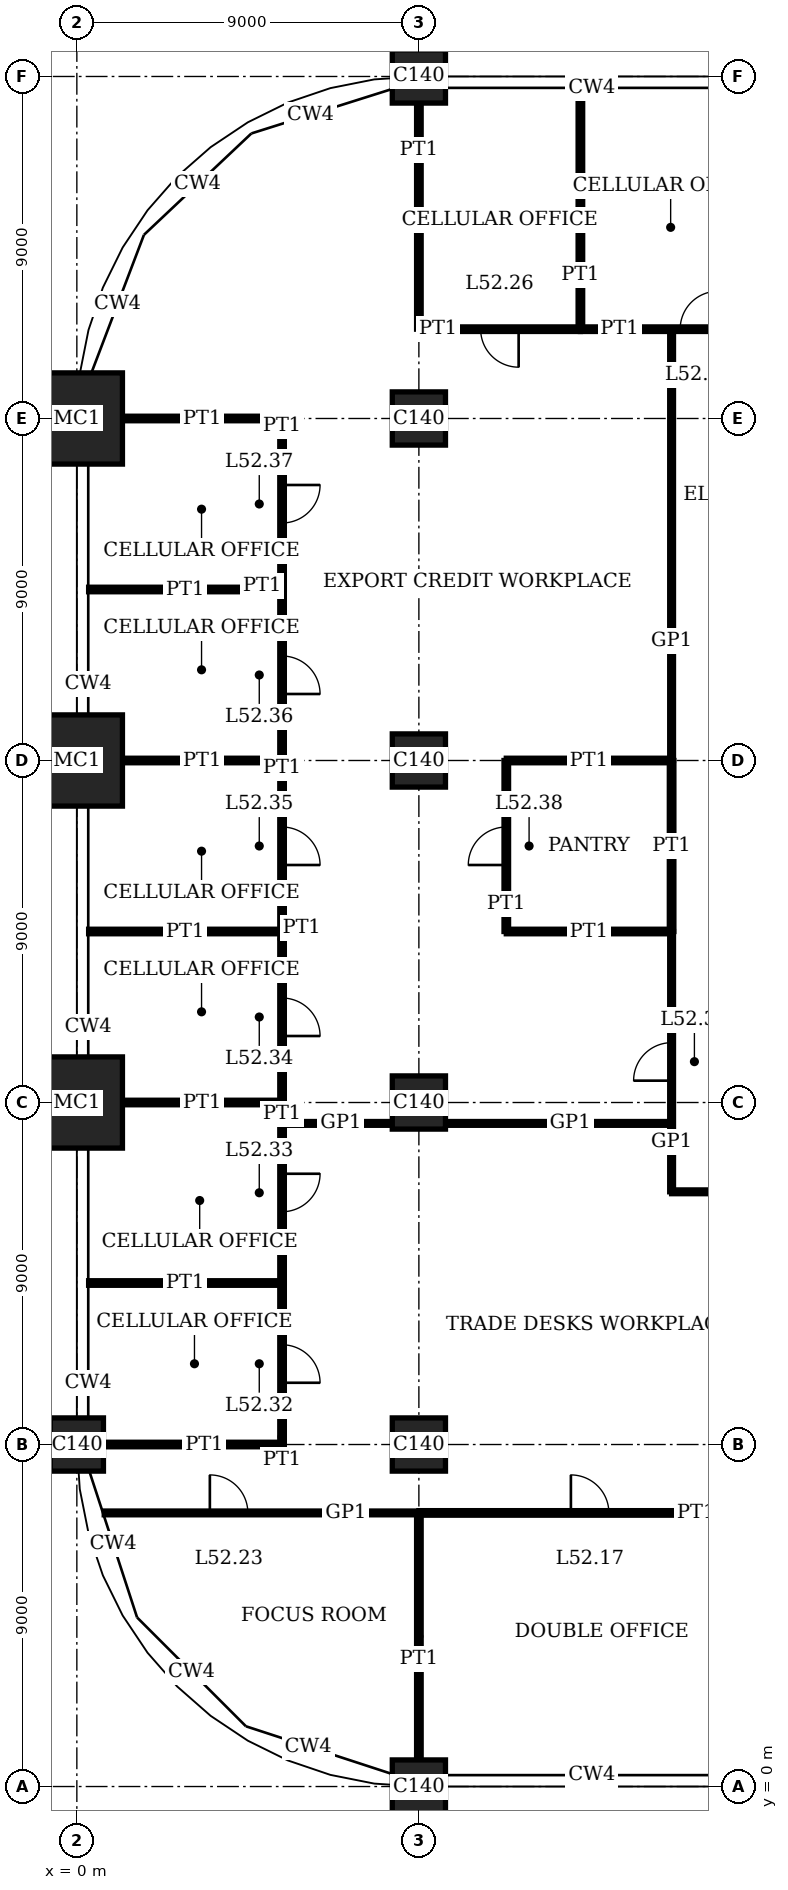
"""IFC4 building model, lengths in metres.
Left out: names, types, materials, properties, quantities, classifications, styles, units other than length and angle.
Written with IfcOpenShell. Run it as: python <this file> out.ifc"""

import sys

from ifc_helpers import new_model, si_unit, direction, frame, frame_2d, origin, origin_2d, place, context, subcontext, project, spatial, rectangle, extrude, element, fill, save


model = new_model("IFC4")
c1 = context("Model", 3, precision=1e-05, world=origin(), true_north=direction((0.0, 1.0)))
c2 = subcontext(c1, "Body", "Model", "MODEL_VIEW")
j1 = project(units=[si_unit("LENGTHUNIT", "METRE"), si_unit("PLANEANGLEUNIT", "RADIAN")], contexts=[c1])
p1 = place(None, origin())
s1 = spatial("IfcSite", under=j1, at=p1, CompositionType="ELEMENT")
p2 = place(p1, origin())
s2 = spatial("IfcBuilding", under=s1, at=p2, CompositionType="ELEMENT")
p3 = place(p2, frame((0.0, 0.0, 214.2)))
s3 = spatial("IfcBuildingStorey", under=s2, at=p3, CompositionType="ELEMENT", Elevation=214.2)
p4 = place(p3, frame((0.0, 9.0, 0.0), z_axis=(0.0, 0.0, 1.0), x_axis=(1.0, 0.0, 0.0)))
e1 = element("IfcColumn", 1, at=p4, inside=s3, PredefinedType="COLUMN", context=c2, shape_type="SweptSolid", body=[
    extrude(rectangle(XDim=1.4, YDim=1.4, at=origin_2d()), origin(), (0.0, 0.0, 1.0), 4.0),
])
for number, where, z_axis, x_axis in (
    (2, (0.0, 18.0, 0.0), (0.0, 0.0, 1.0), (1.0, 0.0, 0.0)),
    (3, (0.0, 27.0, 0.0), (0.0, 0.0, 1.0), (1.0, 0.0, 0.0)),
    (4, (0.0, 36.0, 0.0), (0.0, 0.0, 1.0), (1.0, 0.0, 0.0)),
):
    element("IfcColumn", number, at=place(p3, frame(where, z_axis=z_axis, x_axis=x_axis)), inside=s3, PredefinedType="COLUMN", context=c2, shape_type="SweptSolid", body=[
        extrude(rectangle(XDim=2.4, YDim=2.4, at=origin_2d()), origin(), (0.0, 0.0, 1.0), 4.0),
    ])
for number, where, z_axis, x_axis in (
    (5, (9.0, 0.0, 0.0), (0.0, 0.0, 1.0), (1.0, 0.0, 0.0)),
    (6, (9.0, 9.0, 0.0), (0.0, 0.0, 1.0), (1.0, 0.0, 0.0)),
    (7, (9.0, 18.0, 0.0), (0.0, 0.0, 1.0), (1.0, 0.0, 0.0)),
    (8, (9.0, 27.0, 0.0), (0.0, 0.0, 1.0), (1.0, 0.0, 0.0)),
    (9, (9.0, 36.0, 0.0), (0.0, 0.0, 1.0), (1.0, 0.0, 0.0)),
    (10, (9.0, 45.0, 0.0), (0.0, 0.0, 1.0), (1.0, 0.0, 0.0)),
):
    element("IfcColumn", number, at=place(p3, frame(where, z_axis=z_axis, x_axis=x_axis)), inside=s3, PredefinedType="COLUMN", context=c2, shape_type="SweptSolid", body=[
        extrude(rectangle(XDim=1.4, YDim=1.4, at=origin_2d()), origin(), (0.0, 0.0, 1.0), 4.0),
    ])
p5 = place(p3, frame((9.0, 7.2, 0.0), z_axis=(0.0, 0.0, 1.0), x_axis=(1.0, 0.0, 0.0)))
e11 = element("IfcWall", 11, at=p5, inside=s3, PredefinedType="PARTITIONING", context=c2, shape_type="SweptSolid", body=[
    extrude(rectangle(XDim=9.0, YDim=0.12, at=frame_2d((4.5, 0.0))), origin(), (0.0, 0.0, 1.0), 3.75),
])
p6 = place(p5, frame((4.0, 0.0, 0.0)))
e12 = element("IfcOpeningElement", 12, at=p6, cuts=e11, PredefinedType="OPENING", context=c2, shape_type="SweptSolid", body=[
    extrude(rectangle(XDim=1.0, YDim=2.4, at=frame_2d((0.5, 1.2))), frame((0.0, 0.07, 0.0), z_axis=(0.0, -1.0, 0.0), x_axis=(1.0, 0.0, 0.0)), (0.0, 0.0, 1.0), 0.14),
])
p7 = place(p3, frame((0.72, 7.2, 0.0), z_axis=(0.0, 0.0, 1.0), x_axis=(1.0, 0.0, 0.0)))
e13 = element("IfcWall", 13, at=p7, inside=s3, PredefinedType="PARTITIONING", context=c2, shape_type="SweptSolid", body=[
    extrude(rectangle(XDim=8.28, YDim=0.1, at=frame_2d((4.14, 0.0))), origin(), (0.0, 0.0, 1.0), 3.75),
])
p8 = place(p7, frame((2.78, 0.0, 0.0)))
e14 = element("IfcOpeningElement", 14, at=p8, cuts=e13, PredefinedType="OPENING", context=c2, shape_type="SweptSolid", body=[
    extrude(rectangle(XDim=1.0, YDim=2.4, at=frame_2d((0.5, 1.2))), frame((0.0, 0.06, 0.0), z_axis=(0.0, -1.0, 0.0), x_axis=(1.0, 0.0, 0.0)), (0.0, 0.0, 1.0), 0.12),
])
p9 = place(p3, frame((0.7, 9.0, 0.0), z_axis=(0.0, 0.0, 1.0), x_axis=(1.0, 0.0, 0.0)))
e15 = element("IfcWall", 15, at=p9, inside=s3, PredefinedType="PARTITIONING", context=c2, shape_type="SweptSolid", body=[
    extrude(rectangle(XDim=4.7, YDim=0.12, at=frame_2d((2.35, 0.0))), origin(), (0.0, 0.0, 1.0), 3.05),
])
p10 = place(p3, frame((0.31, 13.25, 0.0), z_axis=(0.0, 0.0, 1.0), x_axis=(1.0, 0.0, 0.0)))
e16 = element("IfcWall", 16, at=p10, inside=s3, PredefinedType="PARTITIONING", context=c2, shape_type="SweptSolid", body=[
    extrude(rectangle(XDim=5.09, YDim=0.12, at=frame_2d((2.545, 0.0))), origin(), (0.0, 0.0, 1.0), 3.1),
])
p11 = place(p3, frame((15.65, 15.65, 0.0), z_axis=(0.0, 0.0, 1.0), x_axis=(1.0, 0.0, 0.0)))
e17 = element("IfcWall", 17, at=p11, inside=s3, PredefinedType="PARTITIONING", context=c2, shape_type="SweptSolid", body=[
    extrude(rectangle(XDim=15.85, YDim=0.1, at=frame_2d((7.925, 0.0))), origin(), (0.0, 0.0, 1.0), 3.75),
])
p12 = place(p11, frame((7.425, 0.0, 0.0)))
e18 = element("IfcOpeningElement", 18, at=p12, cuts=e17, PredefinedType="OPENING", context=c2, shape_type="SweptSolid", body=[
    extrude(rectangle(XDim=1.0, YDim=2.4, at=frame_2d((0.5, 1.2))), frame((0.0, 0.06, 0.0), z_axis=(0.0, -1.0, 0.0), x_axis=(1.0, 0.0, 0.0)), (0.0, 0.0, 1.0), 0.12),
])
p13 = place(p3, frame((5.39, 17.45, 0.0), z_axis=(0.0, 0.0, 1.0), x_axis=(1.0, 0.0, 0.0)))
e19 = element("IfcWall", 19, at=p13, inside=s3, PredefinedType="PARTITIONING", context=c2, shape_type="SweptSolid", body=[
    extrude(rectangle(XDim=2.91, YDim=0.1, at=frame_2d((1.455, 0.0))), origin(), (0.0, 0.0, 1.0), 3.75),
])
p14 = place(p3, frame((9.7, 17.45, 0.0), z_axis=(0.0, 0.0, 1.0), x_axis=(1.0, 0.0, 0.0)))
e20 = element("IfcWall", 20, at=p14, inside=s3, PredefinedType="PARTITIONING", context=c2, shape_type="SweptSolid", body=[
    extrude(rectangle(XDim=5.95, YDim=0.1, at=frame_2d((2.975, 0.0))), origin(), (0.0, 0.0, 1.0), 3.75),
])
p15 = place(p3, frame((1.2, 18.0, 0.0), z_axis=(0.0, 0.0, 1.0), x_axis=(1.0, 0.0, 0.0)))
e21 = element("IfcWall", 21, at=p15, inside=s3, PredefinedType="PARTITIONING", context=c2, shape_type="SweptSolid", body=[
    extrude(rectangle(XDim=4.2, YDim=0.12, at=frame_2d((2.1, 0.0))), origin(), (0.0, 0.0, 1.0), 3.05),
])
p16 = place(p3, frame((0.31, 22.5, 0.0), z_axis=(0.0, 0.0, 1.0), x_axis=(1.0, 0.0, 0.0)))
e22 = element("IfcWall", 22, at=p16, inside=s3, PredefinedType="PARTITIONING", context=c2, shape_type="SweptSolid", body=[
    extrude(rectangle(XDim=5.09, YDim=0.12, at=frame_2d((2.545, 0.0))), origin(), (0.0, 0.0, 1.0), 3.1),
])
p17 = place(p3, frame((11.3, 22.5, 0.0), z_axis=(0.0, 0.0, 1.0), x_axis=(1.0, 0.0, 0.0)))
e23 = element("IfcWall", 23, at=p17, inside=s3, PredefinedType="PARTITIONING", context=c2, shape_type="SweptSolid", body=[
    extrude(rectangle(XDim=4.35, YDim=0.12, at=frame_2d((2.175, 0.0))), origin(), (0.0, 0.0, 1.0), 3.1),
])
p18 = place(p3, frame((1.2, 27.0, 0.0), z_axis=(0.0, 0.0, 1.0), x_axis=(1.0, 0.0, 0.0)))
e24 = element("IfcWall", 24, at=p18, inside=s3, PredefinedType="PARTITIONING", context=c2, shape_type="SweptSolid", body=[
    extrude(rectangle(XDim=4.2, YDim=0.12, at=frame_2d((2.1, 0.0))), origin(), (0.0, 0.0, 1.0), 3.05),
])
p19 = place(p3, frame((11.3, 27.0, 0.0), z_axis=(0.0, 0.0, 1.0), x_axis=(1.0, 0.0, 0.0)))
e25 = element("IfcWall", 25, at=p19, inside=s3, PredefinedType="PARTITIONING", context=c2, shape_type="SweptSolid", body=[
    extrude(rectangle(XDim=4.35, YDim=0.12, at=frame_2d((2.175, 0.0))), origin(), (0.0, 0.0, 1.0), 3.05),
])
p20 = place(p3, frame((0.31, 31.5, 0.0), z_axis=(0.0, 0.0, 1.0), x_axis=(1.0, 0.0, 0.0)))
e26 = element("IfcWall", 26, at=p20, inside=s3, PredefinedType="PARTITIONING", context=c2, shape_type="SweptSolid", body=[
    extrude(rectangle(XDim=5.09, YDim=0.12, at=frame_2d((2.545, 0.0))), origin(), (0.0, 0.0, 1.0), 3.1),
])
p21 = place(p3, frame((1.2, 36.0, 0.0), z_axis=(0.0, 0.0, 1.0), x_axis=(1.0, 0.0, 0.0)))
e27 = element("IfcWall", 27, at=p21, inside=s3, PredefinedType="PARTITIONING", context=c2, shape_type="SweptSolid", body=[
    extrude(rectangle(XDim=4.2, YDim=0.12, at=frame_2d((2.1, 0.0))), origin(), (0.0, 0.0, 1.0), 3.05),
])
p22 = place(p3, frame((9.0, 38.35, 0.0), z_axis=(0.0, 0.0, 1.0), x_axis=(1.0, 0.0, 0.0)))
e28 = element("IfcWall", 28, at=p22, inside=s3, PredefinedType="PARTITIONING", context=c2, shape_type="SweptSolid", body=[
    extrude(rectangle(XDim=4.25, YDim=0.12, at=frame_2d((2.125, 0.0))), origin(), (0.0, 0.0, 1.0), 3.75),
])
p23 = place(p22, frame((1.625, 0.0, 0.0)))
e29 = element("IfcOpeningElement", 29, at=p23, cuts=e28, PredefinedType="OPENING", context=c2, shape_type="SweptSolid", body=[
    extrude(rectangle(XDim=1.0, YDim=2.4, at=frame_2d((0.5, 1.2))), frame((0.0, 0.07, 0.0), z_axis=(0.0, -1.0, 0.0), x_axis=(1.0, 0.0, 0.0)), (0.0, 0.0, 1.0), 0.14),
])
p24 = place(p3, frame((13.25, 38.35, 0.0), z_axis=(0.0, 0.0, 1.0), x_axis=(1.0, 0.0, 0.0)))
e30 = element("IfcWall", 30, at=p24, inside=s3, PredefinedType="PARTITIONING", context=c2, shape_type="SweptSolid", body=[
    extrude(rectangle(XDim=4.75, YDim=0.12, at=frame_2d((2.375, 0.0))), origin(), (0.0, 0.0, 1.0), 3.75),
])
p25 = place(p24, frame((2.625, 0.0, 0.0)))
e31 = element("IfcOpeningElement", 31, at=p25, cuts=e30, PredefinedType="OPENING", context=c2, shape_type="SweptSolid", body=[
    extrude(rectangle(XDim=1.0, YDim=2.4, at=frame_2d((0.5, 1.2))), frame((0.0, 0.07, 0.0), z_axis=(0.0, -1.0, 0.0), x_axis=(1.0, 0.0, 0.0)), (0.0, 0.0, 1.0), 0.14),
])
p26 = place(p3, frame((5.4, 9.0, 0.0), z_axis=(0.0, 0.0, 1.0), x_axis=(0.0, 1.0, 0.0)))
e32 = element("IfcWall", 32, at=p26, inside=s3, PredefinedType="PARTITIONING", context=c2, shape_type="SweptSolid", body=[
    extrude(rectangle(XDim=4.25, YDim=0.12, at=frame_2d((2.125, 0.0))), origin(), (0.0, 0.0, 1.0), 3.75),
])
p27 = place(p26, frame((1.625, 0.0, 0.0)))
e33 = element("IfcOpeningElement", 33, at=p27, cuts=e32, PredefinedType="OPENING", context=c2, shape_type="SweptSolid", body=[
    extrude(rectangle(XDim=1.0, YDim=2.4, at=frame_2d((0.5, 1.2))), frame((0.0, 0.07, 0.0), z_axis=(0.0, -1.0, 0.0), x_axis=(1.0, 0.0, 0.0)), (0.0, 0.0, 1.0), 0.14),
])
p28 = place(p3, frame((5.4, 13.25, 0.0), z_axis=(0.0, 0.0, 1.0), x_axis=(0.0, 1.0, 0.0)))
e34 = element("IfcWall", 34, at=p28, inside=s3, PredefinedType="PARTITIONING", context=c2, shape_type="SweptSolid", body=[
    extrude(rectangle(XDim=4.75, YDim=0.12, at=frame_2d((2.375, 0.0))), origin(), (0.0, 0.0, 1.0), 3.75),
])
p29 = place(p28, frame((1.875, 0.0, 0.0)))
e35 = element("IfcOpeningElement", 35, at=p29, cuts=e34, PredefinedType="OPENING", context=c2, shape_type="SweptSolid", body=[
    extrude(rectangle(XDim=1.0, YDim=2.4, at=frame_2d((0.5, 1.2))), frame((0.0, 0.07, 0.0), z_axis=(0.0, -1.0, 0.0), x_axis=(1.0, 0.0, 0.0)), (0.0, 0.0, 1.0), 0.14),
])
p30 = place(p3, frame((5.4, 18.0, 0.0), z_axis=(0.0, 0.0, 1.0), x_axis=(0.0, 1.0, 0.0)))
e36 = element("IfcWall", 36, at=p30, inside=s3, PredefinedType="PARTITIONING", context=c2, shape_type="SweptSolid", body=[
    extrude(rectangle(XDim=4.5, YDim=0.12, at=frame_2d((2.25, 0.0))), origin(), (0.0, 0.0, 1.0), 3.75),
])
p31 = place(p30, frame((1.75, 0.0, 0.0)))
e37 = element("IfcOpeningElement", 37, at=p31, cuts=e36, PredefinedType="OPENING", context=c2, shape_type="SweptSolid", body=[
    extrude(rectangle(XDim=1.0, YDim=2.4, at=frame_2d((0.5, 1.2))), frame((0.0, 0.07, 0.0), z_axis=(0.0, -1.0, 0.0), x_axis=(1.0, 0.0, 0.0)), (0.0, 0.0, 1.0), 0.14),
])
p32 = place(p3, frame((5.4, 22.5, 0.0), z_axis=(0.0, 0.0, 1.0), x_axis=(0.0, 1.0, 0.0)))
e38 = element("IfcWall", 38, at=p32, inside=s3, PredefinedType="PARTITIONING", context=c2, shape_type="SweptSolid", body=[
    extrude(rectangle(XDim=4.5, YDim=0.12, at=frame_2d((2.25, 0.0))), origin(), (0.0, 0.0, 1.0), 3.75),
])
p33 = place(p32, frame((1.75, 0.0, 0.0)))
e39 = element("IfcOpeningElement", 39, at=p33, cuts=e38, PredefinedType="OPENING", context=c2, shape_type="SweptSolid", body=[
    extrude(rectangle(XDim=1.0, YDim=2.4, at=frame_2d((0.5, 1.2))), frame((0.0, 0.07, 0.0), z_axis=(0.0, -1.0, 0.0), x_axis=(1.0, 0.0, 0.0)), (0.0, 0.0, 1.0), 0.14),
])
p34 = place(p3, frame((5.4, 27.0, 0.0), z_axis=(0.0, 0.0, 1.0), x_axis=(0.0, 1.0, 0.0)))
e40 = element("IfcWall", 40, at=p34, inside=s3, PredefinedType="PARTITIONING", context=c2, shape_type="SweptSolid", body=[
    extrude(rectangle(XDim=4.5, YDim=0.12, at=frame_2d((2.25, 0.0))), origin(), (0.0, 0.0, 1.0), 3.75),
])
p35 = place(p34, frame((1.75, 0.0, 0.0)))
e41 = element("IfcOpeningElement", 41, at=p35, cuts=e40, PredefinedType="OPENING", context=c2, shape_type="SweptSolid", body=[
    extrude(rectangle(XDim=1.0, YDim=2.4, at=frame_2d((0.5, 1.2))), frame((0.0, 0.07, 0.0), z_axis=(0.0, -1.0, 0.0), x_axis=(1.0, 0.0, 0.0)), (0.0, 0.0, 1.0), 0.14),
])
p36 = place(p3, frame((5.4, 31.5, 0.0), z_axis=(0.0, 0.0, 1.0), x_axis=(0.0, 1.0, 0.0)))
e42 = element("IfcWall", 42, at=p36, inside=s3, PredefinedType="PARTITIONING", context=c2, shape_type="SweptSolid", body=[
    extrude(rectangle(XDim=4.5, YDim=0.12, at=frame_2d((2.25, 0.0))), origin(), (0.0, 0.0, 1.0), 3.75),
])
p37 = place(p36, frame((1.75, 0.0, 0.0)))
e43 = element("IfcOpeningElement", 43, at=p37, cuts=e42, PredefinedType="OPENING", context=c2, shape_type="SweptSolid", body=[
    extrude(rectangle(XDim=1.0, YDim=2.4, at=frame_2d((0.5, 1.2))), frame((0.0, 0.07, 0.0), z_axis=(0.0, -1.0, 0.0), x_axis=(1.0, 0.0, 0.0)), (0.0, 0.0, 1.0), 0.14),
])
p38 = place(p3, frame((9.0, 0.7, 0.0), z_axis=(0.0, 0.0, 1.0), x_axis=(0.0, 1.0, 0.0)))
e44 = element("IfcWall", 44, at=p38, inside=s3, PredefinedType="PARTITIONING", context=c2, shape_type="SweptSolid", body=[
    extrude(rectangle(XDim=6.5, YDim=0.12, at=frame_2d((3.25, 0.0))), origin(), (0.0, 0.0, 1.0), 3.05),
])
p39 = place(p3, frame((9.0, 38.35, 0.0), z_axis=(0.0, 0.0, 1.0), x_axis=(0.0, 1.0, 0.0)))
e45 = element("IfcWall", 45, at=p39, inside=s3, PredefinedType="PARTITIONING", context=c2, shape_type="SweptSolid", body=[
    extrude(rectangle(XDim=5.95, YDim=0.12, at=frame_2d((2.975, 0.0))), origin(), (0.0, 0.0, 1.0), 3.05),
])
p40 = place(p3, frame((11.3, 22.5, 0.0), z_axis=(0.0, 0.0, 1.0), x_axis=(0.0, 1.0, 0.0)))
e46 = element("IfcWall", 46, at=p40, inside=s3, PredefinedType="PARTITIONING", context=c2, shape_type="SweptSolid", body=[
    extrude(rectangle(XDim=4.5, YDim=0.12, at=frame_2d((2.25, 0.0))), origin(), (0.0, 0.0, 1.0), 3.75),
])
p41 = place(p40, frame((1.75, 0.0, 0.0)))
e47 = element("IfcOpeningElement", 47, at=p41, cuts=e46, PredefinedType="OPENING", context=c2, shape_type="SweptSolid", body=[
    extrude(rectangle(XDim=1.0, YDim=2.4, at=frame_2d((0.5, 1.2))), frame((0.0, 0.07, 0.0), z_axis=(0.0, -1.0, 0.0), x_axis=(1.0, 0.0, 0.0)), (0.0, 0.0, 1.0), 0.14),
])
p42 = place(p3, frame((13.25, 38.35, 0.0), z_axis=(0.0, 0.0, 1.0), x_axis=(0.0, 1.0, 0.0)))
e48 = element("IfcWall", 48, at=p42, inside=s3, PredefinedType="PARTITIONING", context=c2, shape_type="SweptSolid", body=[
    extrude(rectangle(XDim=6.34, YDim=0.12, at=frame_2d((3.17, 0.0))), origin(), (0.0, 0.0, 1.0), 3.75),
])
p43 = place(p3, frame((15.65, 22.5, 0.0), z_axis=(0.0, 0.0, 1.0), x_axis=(0.0, 1.0, 0.0)))
e49 = element("IfcWall", 49, at=p43, inside=s3, PredefinedType="PARTITIONING", context=c2, shape_type="SweptSolid", body=[
    extrude(rectangle(XDim=4.5, YDim=0.12, at=frame_2d((2.25, 0.0))), origin(), (0.0, 0.0, 1.0), 3.75),
])
p44 = place(p3, frame((15.65, 15.65, 0.0), z_axis=(0.0, 0.0, 1.0), x_axis=(0.0, 1.0, 0.0)))
e50 = element("IfcWall", 50, at=p44, inside=s3, PredefinedType="PARTITIONING", context=c2, shape_type="SweptSolid", body=[
    extrude(rectangle(XDim=6.85, YDim=0.1, at=frame_2d((3.425, 0.0))), origin(), (0.0, 0.0, 1.0), 3.75),
])
p45 = place(p44, frame((2.925, 0.0, 0.0)))
e51 = element("IfcOpeningElement", 51, at=p45, cuts=e50, PredefinedType="OPENING", context=c2, shape_type="SweptSolid", body=[
    extrude(rectangle(XDim=1.0, YDim=2.4, at=frame_2d((0.5, 1.2))), frame((0.0, 0.06, 0.0), z_axis=(0.0, -1.0, 0.0), x_axis=(1.0, 0.0, 0.0)), (0.0, 0.0, 1.0), 0.12),
])
p46 = place(p3, frame((15.65, 27.0, 0.0), z_axis=(0.0, 0.0, 1.0), x_axis=(0.0, 1.0, 0.0)))
e52 = element("IfcWall", 52, at=p46, inside=s3, PredefinedType="PARTITIONING", context=c2, shape_type="SweptSolid", body=[
    extrude(rectangle(XDim=11.35, YDim=0.1, at=frame_2d((5.675, 0.0))), origin(), (0.0, 0.0, 1.0), 3.75),
])
p47 = place(p6, origin())
e53 = element("IfcDoor", 53, at=p47, inside=s3, OperationType="SINGLE_SWING_RIGHT", PredefinedType="DOOR", context=c2, shape_type="SweptSolid", body=[
    extrude(rectangle(XDim=1.0, YDim=2.4, at=frame_2d((0.5, 1.2))), frame((0.0, 0.025, 0.0), z_axis=(0.0, -1.0, 0.0), x_axis=(1.0, 0.0, 0.0)), (0.0, 0.0, 1.0), 0.05),
])
fill(e12, e53)
p48 = place(p8, origin())
e54 = element("IfcDoor", 54, at=p48, inside=s3, OperationType="SINGLE_SWING_RIGHT", PredefinedType="DOOR", context=c2, shape_type="SweptSolid", body=[
    extrude(rectangle(XDim=1.0, YDim=2.4, at=frame_2d((0.5, 1.2))), frame((0.0, 0.02, 0.0), z_axis=(0.0, -1.0, 0.0), x_axis=(1.0, 0.0, 0.0)), (0.0, 0.0, 1.0), 0.04),
])
fill(e14, e54)
p49 = place(p23, origin())
e55 = element("IfcDoor", 55, at=p49, inside=s3, OperationType="SINGLE_SWING_RIGHT", PredefinedType="DOOR", context=c2, shape_type="SweptSolid", body=[
    extrude(rectangle(XDim=1.0, YDim=2.4, at=frame_2d((0.5, 1.2))), frame((0.0, 0.025, 0.0), z_axis=(0.0, -1.0, 0.0), x_axis=(1.0, 0.0, 0.0)), (0.0, 0.0, 1.0), 0.05),
])
fill(e29, e55)
p50 = place(p25, origin())
e56 = element("IfcDoor", 56, at=p50, inside=s3, OperationType="SINGLE_SWING_LEFT", PredefinedType="DOOR", context=c2, shape_type="SweptSolid", body=[
    extrude(rectangle(XDim=1.0, YDim=2.4, at=frame_2d((0.5, 1.2))), frame((0.0, 0.025, 0.0), z_axis=(0.0, -1.0, 0.0), x_axis=(1.0, 0.0, 0.0)), (0.0, 0.0, 1.0), 0.05),
])
fill(e31, e56)
p51 = place(p27, origin())
e57 = element("IfcDoor", 57, at=p51, inside=s3, OperationType="SINGLE_SWING_LEFT", PredefinedType="DOOR", context=c2, shape_type="SweptSolid", body=[
    extrude(rectangle(XDim=1.0, YDim=2.4, at=frame_2d((0.5, 1.2))), frame((0.0, 0.025, 0.0), z_axis=(0.0, -1.0, 0.0), x_axis=(1.0, 0.0, 0.0)), (0.0, 0.0, 1.0), 0.05),
])
fill(e33, e57)
p52 = place(p29, origin())
e58 = element("IfcDoor", 58, at=p52, inside=s3, OperationType="SINGLE_SWING_RIGHT", PredefinedType="DOOR", context=c2, shape_type="SweptSolid", body=[
    extrude(rectangle(XDim=1.0, YDim=2.4, at=frame_2d((0.5, 1.2))), frame((0.0, 0.025, 0.0), z_axis=(0.0, -1.0, 0.0), x_axis=(1.0, 0.0, 0.0)), (0.0, 0.0, 1.0), 0.05),
])
fill(e35, e58)
p53 = place(p31, origin())
e59 = element("IfcDoor", 59, at=p53, inside=s3, OperationType="SINGLE_SWING_LEFT", PredefinedType="DOOR", context=c2, shape_type="SweptSolid", body=[
    extrude(rectangle(XDim=1.0, YDim=2.4, at=frame_2d((0.5, 1.2))), frame((0.0, 0.025, 0.0), z_axis=(0.0, -1.0, 0.0), x_axis=(1.0, 0.0, 0.0)), (0.0, 0.0, 1.0), 0.05),
])
fill(e37, e59)
p54 = place(p33, origin())
e60 = element("IfcDoor", 60, at=p54, inside=s3, OperationType="SINGLE_SWING_LEFT", PredefinedType="DOOR", context=c2, shape_type="SweptSolid", body=[
    extrude(rectangle(XDim=1.0, YDim=2.4, at=frame_2d((0.5, 1.2))), frame((0.0, 0.025, 0.0), z_axis=(0.0, -1.0, 0.0), x_axis=(1.0, 0.0, 0.0)), (0.0, 0.0, 1.0), 0.05),
])
fill(e39, e60)
p55 = place(p35, origin())
e61 = element("IfcDoor", 61, at=p55, inside=s3, OperationType="SINGLE_SWING_LEFT", PredefinedType="DOOR", context=c2, shape_type="SweptSolid", body=[
    extrude(rectangle(XDim=1.0, YDim=2.4, at=frame_2d((0.5, 1.2))), frame((0.0, 0.025, 0.0), z_axis=(0.0, -1.0, 0.0), x_axis=(1.0, 0.0, 0.0)), (0.0, 0.0, 1.0), 0.05),
])
fill(e41, e61)
p56 = place(p37, origin())
e62 = element("IfcDoor", 62, at=p56, inside=s3, OperationType="SINGLE_SWING_RIGHT", PredefinedType="DOOR", context=c2, shape_type="SweptSolid", body=[
    extrude(rectangle(XDim=1.0, YDim=2.4, at=frame_2d((0.5, 1.2))), frame((0.0, 0.025, 0.0), z_axis=(0.0, -1.0, 0.0), x_axis=(1.0, 0.0, 0.0)), (0.0, 0.0, 1.0), 0.05),
])
fill(e43, e62)
p57 = place(p41, origin())
e63 = element("IfcDoor", 63, at=p57, inside=s3, OperationType="SINGLE_SWING_RIGHT", PredefinedType="DOOR", context=c2, shape_type="SweptSolid", body=[
    extrude(rectangle(XDim=1.0, YDim=2.4, at=frame_2d((0.5, 1.2))), frame((0.0, 0.025, 0.0), z_axis=(0.0, -1.0, 0.0), x_axis=(1.0, 0.0, 0.0)), (0.0, 0.0, 1.0), 0.05),
])
fill(e47, e63)
p58 = place(p45, origin())
e64 = element("IfcDoor", 64, at=p58, inside=s3, OperationType="SINGLE_SWING_RIGHT", PredefinedType="DOOR", context=c2, shape_type="SweptSolid", body=[
    extrude(rectangle(XDim=1.0, YDim=2.4, at=frame_2d((0.5, 1.2))), frame((0.0, 0.02, 0.0), z_axis=(0.0, -1.0, 0.0), x_axis=(1.0, 0.0, 0.0)), (0.0, 0.0, 1.0), 0.04),
])
fill(e51, e64)
save(model, sys.argv[1])
